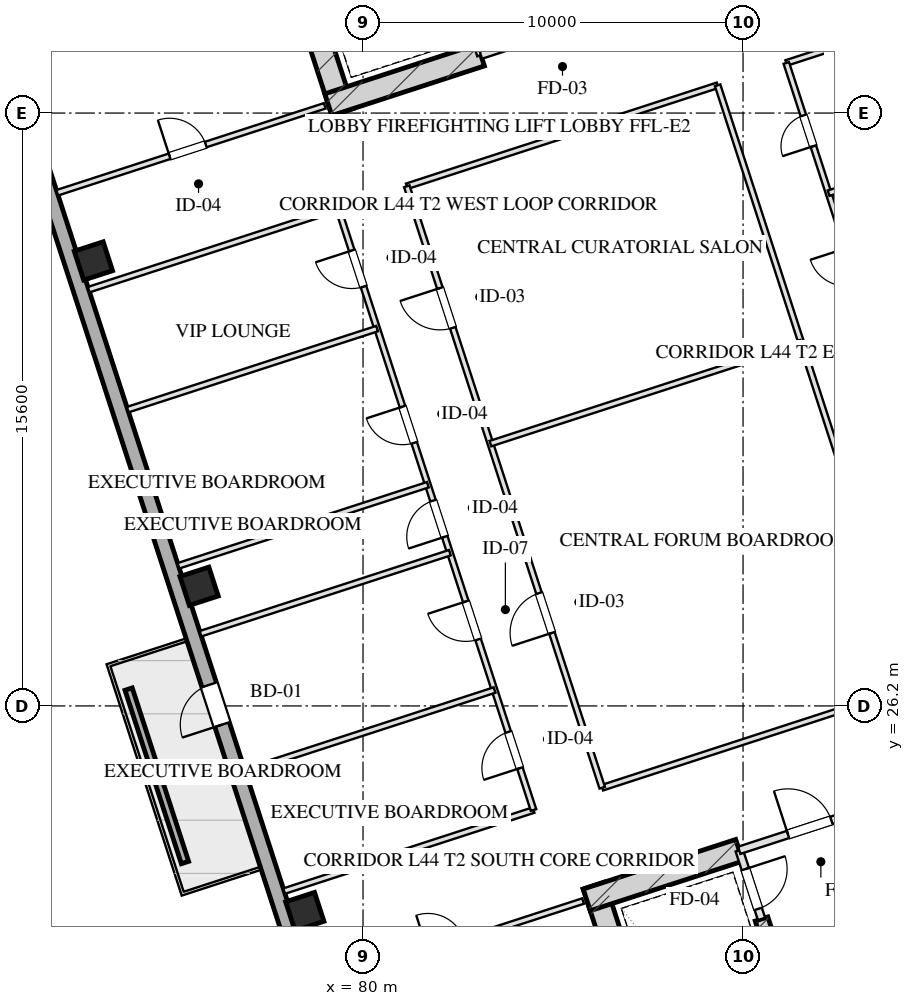
"""IFC4 building model, lengths in metres.
Left out: names, types, materials, properties, quantities, classifications, styles, units other than length and angle.
Written with IfcOpenShell. Run it as: python <this file> out.ifc"""

import sys

from ifc_helpers import new_model, si_unit, direction, frame, frame_2d, origin, origin_2d, place, context, subcontext, project, spatial, rectangle, hollow_rectangle, extrude, element, fill, save


model = new_model("IFC4")
c1 = context("Model", 3, precision=1e-05, world=origin(), true_north=direction((0.0, 1.0)))
c2 = subcontext(c1, "Body", "Model", "MODEL_VIEW")
j1 = project(units=[si_unit("LENGTHUNIT", "METRE"), si_unit("PLANEANGLEUNIT", "RADIAN")], contexts=[c1])
p1 = place(None, origin())
s1 = spatial("IfcSite", under=j1, at=p1, CompositionType="ELEMENT")
p2 = place(p1, origin())
s2 = spatial("IfcBuilding", under=s1, at=p2, CompositionType="ELEMENT")
p3 = place(p2, frame((0.0, 0.0, 166.75)))
s3 = spatial("IfcBuildingStorey", under=s2, at=p3, CompositionType="ELEMENT", Elevation=166.75)
p4 = place(p3, frame((86.078, 21.475, 0.0), z_axis=(0.0, 0.0, 1.0), x_axis=(0.309017938678, -0.951056209472, 0.0)))
e1 = element("IfcWall", 1, at=p4, inside=s3, PredefinedType="SHEAR", context=c2, shape_type="SweptSolid", body=[
    extrude(rectangle(XDim=9.48, YDim=0.6, at=frame_2d((4.74, 0.0))), origin(), (0.0, 0.0, 1.0), 3.45),
])
p5 = place(p3, frame((90.486, 20.594, 0.0), z_axis=(0.0, 0.0, 1.0), x_axis=(0.309020428229, -0.951055400562, 0.0)))
e2 = element("IfcWall", 2, at=p5, inside=s3, PredefinedType="SHEAR", context=c2, shape_type="SweptSolid", body=[
    extrude(rectangle(XDim=6.98, YDim=0.35, at=frame_2d((3.49, 0.0))), origin(), (0.0, 0.0, 1.0), 3.45),
])
p6 = place(p3, frame((85.886, 21.097, 0.0), z_axis=(0.0, 0.0, 1.0), x_axis=(0.951068073652, 0.308981422225, 0.0)))
e3 = element("IfcWall", 3, at=p6, inside=s3, PredefinedType="SHEAR", context=c2, shape_type="SweptSolid", body=[
    extrude(rectangle(XDim=4.22, YDim=0.6, at=frame_2d((2.11, 0.0))), origin(), (0.0, 0.0, 1.0), 3.45),
])
p7 = place(p3, frame((79.466, 41.828, 0.0), z_axis=(0.0, 0.0, 1.0), x_axis=(-0.309041232772, 0.951048640421, 0.0)))
e4 = element("IfcWall", 4, at=p7, inside=s3, PredefinedType="SHEAR", context=c2, shape_type="SweptSolid", body=[
    extrude(rectangle(XDim=9.48, YDim=0.6, at=frame_2d((4.74, 0.0))), origin(), (0.0, 0.0, 1.0), 3.45),
])
p8 = place(p3, frame((79.087, 42.021, 0.0), z_axis=(0.0, 0.0, 1.0), x_axis=(0.951062550203, 0.3089984233, 0.0)))
e5 = element("IfcWall", 5, at=p8, inside=s3, PredefinedType="SHEAR", context=c2, shape_type="SweptSolid", body=[
    extrude(rectangle(XDim=4.22, YDim=0.6, at=frame_2d((2.11, 0.0))), origin(), (0.0, 0.0, 1.0), 3.45),
])
for number, where, z_axis, x_axis in (
    (6, (78.468, 20.79, 0.0), (0.0, 0.0, 1.0), (0.951, 0.309, 0.0)),
    (7, (75.687, 29.349, 0.0), (0.0, 0.0, 1.0), (0.951, 0.309, 0.0)),
    (8, (72.906, 37.909, 0.0), (0.0, 0.0, 1.0), (0.951, 0.309, 0.0)),
):
    element("IfcColumn", number, at=place(p3, frame(where, z_axis=z_axis, x_axis=x_axis)), inside=s3, PredefinedType="COLUMN", context=c2, shape_type="SweptSolid", body=[
        extrude(hollow_rectangle(XDim=0.8, YDim=0.8, WallThickness=0.028, at=origin_2d()), origin(), (0.0, 0.0, 1.0), 3.451),
    ])
p9 = place(p3, frame((81.776, 8.827, 0.0), z_axis=(0.0, 0.0, 1.0), x_axis=(-0.309014228706, 0.951057414911, 0.0)))
e9 = element("IfcWall", 9, at=p9, inside=s3, PredefinedType="SOLIDWALL", context=c2, shape_type="SweptSolid", body=[
    extrude(rectangle(XDim=42.8, YDim=0.4, at=frame_2d((21.4, 0.0))), origin(), (0.0, 0.0, 1.0), 2.61),
])
p10 = place(p9, frame((17.75, 0.0, 0.0)))
e10 = element("IfcOpeningElement", 10, at=p10, cuts=e9, PredefinedType="OPENING", context=c2, shape_type="SweptSolid", body=[
    extrude(rectangle(XDim=1.1, YDim=2.15, at=frame_2d((0.55, 1.075))), frame((0.0, 0.21, 0.0), z_axis=(0.0, -1.0, 0.0), x_axis=(1.0, 0.0, 0.0)), (0.0, 0.0, 1.0), 0.42),
])
p11 = place(p3, frame((75.315, 22.079, 0.0), z_axis=(0.0, 0.0, 1.0), x_axis=(-0.309032019345, 0.951051634255, 0.0)))
e11 = element("IfcWall", 11, at=p11, inside=s3, PredefinedType="PARAPET", context=c2, shape_type="SweptSolid", body=[
    extrude(rectangle(XDim=4.8, YDim=0.2, at=frame_2d((2.4, 0.0))), origin(), (0.0, 0.0, 1.0), 0.75),
])
p12 = place(p3, frame((89.899, 22.401, 0.0), z_axis=(0.0, 0.0, 1.0), x_axis=(0.308932062672, -0.951084108086, 0.0)))
e12 = element("IfcWall", 12, at=p12, inside=s3, PredefinedType="PARTITIONING", context=c2, shape_type="SweptSolid", body=[
    extrude(rectangle(XDim=1.9, YDim=0.2, at=frame_2d((0.95, 0.0))), origin(), (0.0, 0.0, 1.0), 3.175),
])
p13 = place(p12, frame((0.52, 0.0, 0.0)))
e13 = element("IfcOpeningElement", 13, at=p13, cuts=e12, PredefinedType="OPENING", context=c2, shape_type="SweptSolid", body=[
    extrude(rectangle(XDim=1.1, YDim=2.05, at=frame_2d((0.55, 1.025))), frame((0.0, 0.11, 0.0), z_axis=(0.0, -1.0, 0.0), x_axis=(1.0, 0.0, 0.0)), (0.0, 0.0, 1.0), 0.22),
])
p14 = place(p3, frame((89.899, 22.401, 0.0), z_axis=(0.0, 0.0, 1.0), x_axis=(0.951046716504, 0.309047153403, 0.0)))
e14 = element("IfcWall", 14, at=p14, inside=s3, PredefinedType="PARTITIONING", context=c2, shape_type="SweptSolid", body=[
    extrude(rectangle(XDim=3.83, YDim=0.2, at=frame_2d((1.915, 0.0))), origin(), (0.0, 0.0, 1.0), 3.175),
])
p15 = place(p14, frame((1.35, 0.0, 0.0)))
e15 = element("IfcOpeningElement", 15, at=p15, cuts=e14, PredefinedType="OPENING", context=c2, shape_type="SweptSolid", body=[
    extrude(rectangle(XDim=1.2, YDim=2.05, at=frame_2d((0.6, 1.025))), frame((0.0, 0.11, 0.0), z_axis=(0.0, -1.0, 0.0), x_axis=(1.0, 0.0, 0.0)), (0.0, 0.0, 1.0), 0.22),
])
p16 = place(p3, frame((83.101, 43.324, 0.0), z_axis=(0.0, 0.0, 1.0), x_axis=(-0.309048298632, 0.951046344356, 0.0)))
e16 = element("IfcWall", 16, at=p16, inside=s3, PredefinedType="PARTITIONING", context=c2, shape_type="SweptSolid", body=[
    extrude(rectangle(XDim=1.9, YDim=0.2, at=frame_2d((0.95, 0.0))), origin(), (0.0, 0.0, 1.0), 3.175),
])
p17 = place(p16, frame((0.52, 0.0, 0.0)))
e17 = element("IfcOpeningElement", 17, at=p17, cuts=e16, PredefinedType="OPENING", context=c2, shape_type="SweptSolid", body=[
    extrude(rectangle(XDim=1.1, YDim=2.05, at=frame_2d((0.55, 1.025))), frame((0.0, 0.11, 0.0), z_axis=(0.0, -1.0, 0.0), x_axis=(1.0, 0.0, 0.0)), (0.0, 0.0, 1.0), 0.22),
])
p18 = place(p3, frame((83.101, 43.324, 0.0), z_axis=(0.0, 0.0, 1.0), x_axis=(0.951052804469, 0.309028417967, 0.0)))
e18 = element("IfcWall", 18, at=p18, inside=s3, PredefinedType="PARTITIONING", context=c2, shape_type="SweptSolid", body=[
    extrude(rectangle(XDim=3.83, YDim=0.2, at=frame_2d((1.915, 0.0))), origin(), (0.0, 0.0, 1.0), 3.175),
])
p19 = place(p18, frame((1.35, 0.0, 0.0)))
e19 = element("IfcOpeningElement", 19, at=p19, cuts=e18, PredefinedType="OPENING", context=c2, shape_type="SweptSolid", body=[
    extrude(rectangle(XDim=1.2, YDim=2.05, at=frame_2d((0.6, 1.025))), frame((0.0, 0.11, 0.0), z_axis=(0.0, -1.0, 0.0), x_axis=(1.0, 0.0, 0.0)), (0.0, 0.0, 1.0), 0.22),
])
p20 = place(p3, frame((78.753, 18.78, 0.0), z_axis=(0.0, 0.0, 1.0), x_axis=(0.951060977215, 0.309003264738, 0.0)))
e20 = element("IfcWall", 20, at=p20, inside=s3, PredefinedType="PARTITIONING", context=c2, shape_type="SweptSolid", body=[
    extrude(rectangle(XDim=7.4, YDim=0.15, at=frame_2d((3.7, 0.0))), origin(), (0.0, 0.0, 1.0), 3.175),
])
p21 = place(p20, frame((3.108, 0.0, 0.0)))
e21 = element("IfcOpeningElement", 21, at=p21, cuts=e20, PredefinedType="OPENING", context=c2, shape_type="SweptSolid", body=[
    extrude(rectangle(XDim=1.0, YDim=2.05, at=frame_2d((0.5, 1.025))), frame((0.0, 0.085, 0.0), z_axis=(0.0, -1.0, 0.0), x_axis=(1.0, 0.0, 0.0)), (0.0, 0.0, 1.0), 0.17),
])
p22 = place(p3, frame((71.955, 39.703, 0.0), z_axis=(0.0, 0.0, 1.0), x_axis=(0.951060977215, 0.309003264738, 0.0)))
e22 = element("IfcWall", 22, at=p22, inside=s3, PredefinedType="PARTITIONING", context=c2, shape_type="SweptSolid", body=[
    extrude(rectangle(XDim=7.4, YDim=0.15, at=frame_2d((3.7, 0.0))), origin(), (0.0, 0.0, 1.0), 3.175),
])
p23 = place(p22, frame((3.108, 0.0, 0.0)))
e23 = element("IfcOpeningElement", 23, at=p23, cuts=e22, PredefinedType="OPENING", context=c2, shape_type="SweptSolid", body=[
    extrude(rectangle(XDim=1.0, YDim=2.05, at=frame_2d((0.5, 1.025))), frame((0.0, 0.085, 0.0), z_axis=(0.0, -1.0, 0.0), x_axis=(1.0, 0.0, 0.0)), (0.0, 0.0, 1.0), 0.17),
])
p24 = place(p3, frame((77.925, 21.328, 0.0), z_axis=(0.0, 0.0, 1.0), x_axis=(0.951061887302, 0.309000463626, 0.0)))
e24 = element("IfcWall", 24, at=p24, inside=s3, PredefinedType="PARTITIONING", context=c2, shape_type="SweptSolid", body=[
    extrude(rectangle(XDim=6.9, YDim=0.15, at=frame_2d((3.45, 0.0))), origin(), (0.0, 0.0, 1.0), 3.175),
])
p25 = place(p3, frame((86.294, 24.048, 0.0), z_axis=(0.0, 0.0, 1.0), x_axis=(0.951052008164, 0.309030868631, 0.0)))
e25 = element("IfcWall", 25, at=p25, inside=s3, PredefinedType="PARTITIONING", context=c2, shape_type="SweptSolid", body=[
    extrude(rectangle(XDim=8.6, YDim=0.15, at=frame_2d((4.3, 0.0))), origin(), (0.0, 0.0, 1.0), 3.175),
])
p26 = place(p3, frame((72.783, 37.154, 0.0), z_axis=(0.0, 0.0, 1.0), x_axis=(0.951051488548, 0.309032467762, 0.0)))
e26 = element("IfcWall", 26, at=p26, inside=s3, PredefinedType="PARTITIONING", context=c2, shape_type="SweptSolid", body=[
    extrude(rectangle(XDim=6.9, YDim=0.15, at=frame_2d((3.45, 0.0))), origin(), (0.0, 0.0, 1.0), 3.175),
])
p27 = place(p3, frame((81.152, 39.873, 0.0), z_axis=(0.0, 0.0, 1.0), x_axis=(0.951057640494, 0.309013534425, 0.0)))
e27 = element("IfcWall", 27, at=p27, inside=s3, PredefinedType="PARTITIONING", context=c2, shape_type="SweptSolid", body=[
    extrude(rectangle(XDim=8.6, YDim=0.15, at=frame_2d((4.3, 0.0))), origin(), (0.0, 0.0, 1.0), 3.175),
])
p28 = place(p3, frame((91.138, 43.118, 0.0), z_axis=(0.0, 0.0, 1.0), x_axis=(0.951054972381, 0.309021746015, 0.0)))
e28 = element("IfcWall", 28, at=p28, inside=s3, PredefinedType="PARTITIONING", context=c2, shape_type="SweptSolid", body=[
    extrude(rectangle(XDim=11.5, YDim=0.15, at=frame_2d((5.75, 0.0))), origin(), (0.0, 0.0, 1.0), 3.175),
])
p29 = place(p3, frame((84.487, 23.46, 0.0), z_axis=(0.0, 0.0, 1.0), x_axis=(-0.30901773025, 0.951056277195, 0.0)))
e29 = element("IfcWall", 29, at=p29, inside=s3, PredefinedType="PARTITIONING", context=c2, shape_type="SweptSolid", body=[
    extrude(rectangle(XDim=16.64, YDim=0.15, at=frame_2d((8.32, 0.0))), origin(), (0.0, 0.0, 1.0), 3.175),
])
p30 = place(p29, frame((1.16, 0.0, 0.0)))
e30 = element("IfcOpeningElement", 30, at=p30, cuts=e29, PredefinedType="OPENING", context=c2, shape_type="SweptSolid", body=[
    extrude(rectangle(XDim=1.0, YDim=2.05, at=frame_2d((0.5, 1.025))), frame((0.0, 0.085, 0.0), z_axis=(0.0, -1.0, 0.0), x_axis=(1.0, 0.0, 0.0)), (0.0, 0.0, 1.0), 0.17),
])
p31 = place(p29, frame((4.72, 0.0, 0.0)))
e31 = element("IfcOpeningElement", 31, at=p31, cuts=e29, PredefinedType="OPENING", context=c2, shape_type="SweptSolid", body=[
    extrude(rectangle(XDim=1.05, YDim=2.05, at=frame_2d((0.525, 1.025))), frame((0.0, 0.085, 0.0), z_axis=(0.0, -1.0, 0.0), x_axis=(1.0, 0.0, 0.0)), (0.0, 0.0, 1.0), 0.17),
])
p32 = place(p29, frame((7.56, 0.0, 0.0)))
e32 = element("IfcOpeningElement", 32, at=p32, cuts=e29, PredefinedType="OPENING", context=c2, shape_type="SweptSolid", body=[
    extrude(rectangle(XDim=1.0, YDim=2.05, at=frame_2d((0.5, 1.025))), frame((0.0, 0.085, 0.0), z_axis=(0.0, -1.0, 0.0), x_axis=(1.0, 0.0, 0.0)), (0.0, 0.0, 1.0), 0.17),
])
p33 = place(p29, frame((10.16, 0.0, 0.0)))
e33 = element("IfcOpeningElement", 33, at=p33, cuts=e29, PredefinedType="OPENING", context=c2, shape_type="SweptSolid", body=[
    extrude(rectangle(XDim=1.0, YDim=2.05, at=frame_2d((0.5, 1.025))), frame((0.0, 0.085, 0.0), z_axis=(0.0, -1.0, 0.0), x_axis=(1.0, 0.0, 0.0)), (0.0, 0.0, 1.0), 0.17),
])
p34 = place(p29, frame((14.48, 0.0, 0.0)))
e34 = element("IfcOpeningElement", 34, at=p34, cuts=e29, PredefinedType="OPENING", context=c2, shape_type="SweptSolid", body=[
    extrude(rectangle(XDim=1.0, YDim=2.05, at=frame_2d((0.5, 1.025))), frame((0.0, 0.085, 0.0), z_axis=(0.0, -1.0, 0.0), x_axis=(1.0, 0.0, 0.0)), (0.0, 0.0, 1.0), 0.17),
])
p35 = place(p3, frame((86.294, 24.048, 0.0), z_axis=(0.0, 0.0, 1.0), x_axis=(-0.309004459387, 0.951060589068, 0.0)))
e35 = element("IfcWall", 35, at=p35, inside=s3, PredefinedType="PARTITIONING", context=c2, shape_type="SweptSolid", body=[
    extrude(rectangle(XDim=16.64, YDim=0.15, at=frame_2d((8.32, 0.0))), origin(), (0.0, 0.0, 1.0), 3.175),
])
p36 = place(p35, frame((4.284, 0.0, 0.0)))
e36 = element("IfcOpeningElement", 36, at=p36, cuts=e35, PredefinedType="OPENING", context=c2, shape_type="SweptSolid", body=[
    extrude(rectangle(XDim=1.1, YDim=2.05, at=frame_2d((0.55, 1.025))), frame((0.0, 0.085, 0.0), z_axis=(0.0, -1.0, 0.0), x_axis=(1.0, 0.0, 0.0)), (0.0, 0.0, 1.0), 0.17),
])
p37 = place(p35, frame((12.724, 0.0, 0.0)))
e37 = element("IfcOpeningElement", 37, at=p37, cuts=e35, PredefinedType="OPENING", context=c2, shape_type="SweptSolid", body=[
    extrude(rectangle(XDim=1.1, YDim=2.05, at=frame_2d((0.55, 1.025))), frame((0.0, 0.085, 0.0), z_axis=(0.0, -1.0, 0.0), x_axis=(1.0, 0.0, 0.0)), (0.0, 0.0, 1.0), 0.17),
])
p38 = place(p3, frame((94.473, 26.705, 0.0), z_axis=(0.0, 0.0, 1.0), x_axis=(-0.309022042254, 0.951054876125, 0.0)))
e38 = element("IfcWall", 38, at=p38, inside=s3, PredefinedType="PARTITIONING", context=c2, shape_type="SweptSolid", body=[
    extrude(rectangle(XDim=16.64, YDim=0.15, at=frame_2d((8.32, 0.0))), origin(), (0.0, 0.0, 1.0), 3.175),
])
p39 = place(p3, frame((96.28, 27.292, 0.0), z_axis=(0.0, 0.0, 1.0), x_axis=(-0.309008771245, 0.951059188113, 0.0)))
e39 = element("IfcWall", 39, at=p39, inside=s3, PredefinedType="PARTITIONING", context=c2, shape_type="SweptSolid", body=[
    extrude(rectangle(XDim=16.64, YDim=0.15, at=frame_2d((8.32, 0.0))), origin(), (0.0, 0.0, 1.0), 3.175),
])
p40 = place(p39, frame((1.526, 0.0, 0.0)))
e40 = element("IfcOpeningElement", 40, at=p40, cuts=e39, PredefinedType="OPENING", context=c2, shape_type="SweptSolid", body=[
    extrude(rectangle(XDim=1.0, YDim=2.05, at=frame_2d((0.5, 1.025))), frame((0.0, 0.085, 0.0), z_axis=(0.0, -1.0, 0.0), x_axis=(1.0, 0.0, 0.0)), (0.0, 0.0, 1.0), 0.17),
])
p41 = place(p39, frame((6.026, 0.0, 0.0)))
e41 = element("IfcOpeningElement", 41, at=p41, cuts=e39, PredefinedType="OPENING", context=c2, shape_type="SweptSolid", body=[
    extrude(rectangle(XDim=1.05, YDim=2.05, at=frame_2d((0.525, 1.025))), frame((0.0, 0.085, 0.0), z_axis=(0.0, -1.0, 0.0), x_axis=(1.0, 0.0, 0.0)), (0.0, 0.0, 1.0), 0.17),
])
p42 = place(p39, frame((10.519, 0.0, 0.0)))
e42 = element("IfcOpeningElement", 42, at=p42, cuts=e39, PredefinedType="OPENING", context=c2, shape_type="SweptSolid", body=[
    extrude(rectangle(XDim=1.0, YDim=2.05, at=frame_2d((0.5, 1.025))), frame((0.0, 0.085, 0.0), z_axis=(0.0, -1.0, 0.0), x_axis=(1.0, 0.0, 0.0)), (0.0, 0.0, 1.0), 0.17),
])
p43 = place(p39, frame((14.338, 0.0, 0.0)))
e43 = element("IfcOpeningElement", 43, at=p43, cuts=e39, PredefinedType="OPENING", context=c2, shape_type="SweptSolid", body=[
    extrude(rectangle(XDim=0.85, YDim=2.05, at=frame_2d((0.425, 1.025))), frame((0.0, 0.085, 0.0), z_axis=(0.0, -1.0, 0.0), x_axis=(1.0, 0.0, 0.0)), (0.0, 0.0, 1.0), 0.17),
])
p44 = place(p3, frame((83.352, 33.102, 0.0), z_axis=(0.0, 0.0, 1.0), x_axis=(0.951057640494, 0.309013534425, 0.0)))
e44 = element("IfcWall", 44, at=p44, inside=s3, PredefinedType="PARTITIONING", context=c2, shape_type="SweptSolid", body=[
    extrude(rectangle(XDim=8.6, YDim=0.15, at=frame_2d((4.3, 0.0))), origin(), (0.0, 0.0, 1.0), 3.175),
])
for number, where, z_axis, x_axis in (
    (45, (76.899, 24.486, 0.0), (0.0, 0.0, 1.0), (0.951, 0.309, 0.0)),
    (46, (75.725, 28.1, 0.0), (0.0, 0.0, 1.0), (0.951, 0.309, 0.0)),
    (47, (75.144, 29.888, 0.0), (0.0, 0.0, 1.0), (0.951, 0.309, 0.0)),
    (48, (73.809, 33.996, 0.0), (0.0, 0.0, 1.0), (0.951, 0.309, 0.0)),
):
    element("IfcWall", number, at=place(p3, frame(where, z_axis=z_axis, x_axis=x_axis)), inside=s3, PredefinedType="PARTITIONING", context=c2, shape_type="SweptSolid", body=[
        extrude(rectangle(XDim=6.9, YDim=0.15, at=frame_2d((3.45, 0.0))), origin(), (0.0, 0.0, 1.0), 3.175),
    ])
p45 = place(p3, frame((92.251, 39.691, 0.0), z_axis=(0.0, 0.0, 1.0), x_axis=(0.951063238644, 0.308996304347, 0.0)))
e49 = element("IfcWall", 49, at=p45, inside=s3, PredefinedType="PARTITIONING", context=c2, shape_type="SweptSolid", body=[
    extrude(rectangle(XDim=11.5, YDim=0.15, at=frame_2d((5.75, 0.0))), origin(), (0.0, 0.0, 1.0), 3.175),
])
p46 = place(p10, origin())
e50 = element("IfcDoor", 50, at=p46, inside=s3, OperationType="SINGLE_SWING_LEFT", PredefinedType="DOOR", context=c2, shape_type="SweptSolid", body=[
    extrude(rectangle(XDim=1.1, YDim=2.15, at=frame_2d((0.55, 1.075))), frame((0.0, 0.025, 0.0), z_axis=(0.0, -1.0, 0.0), x_axis=(1.0, 0.0, 0.0)), (0.0, 0.0, 1.0), 0.05),
])
fill(e10, e50)
p47 = place(p13, origin())
e51 = element("IfcDoor", 51, at=p47, inside=s3, OperationType="SINGLE_SWING_LEFT", PredefinedType="DOOR", context=c2, shape_type="SweptSolid", body=[
    extrude(rectangle(XDim=1.1, YDim=2.05, at=frame_2d((0.55, 1.025))), frame((0.0, 0.025, 0.0), z_axis=(0.0, -1.0, 0.0), x_axis=(1.0, 0.0, 0.0)), (0.0, 0.0, 1.0), 0.05),
])
fill(e13, e51)
p48 = place(p15, origin())
e52 = element("IfcDoor", 52, at=p48, inside=s3, OperationType="SINGLE_SWING_LEFT", PredefinedType="DOOR", context=c2, shape_type="SweptSolid", body=[
    extrude(rectangle(XDim=1.2, YDim=2.05, at=frame_2d((0.6, 1.025))), frame((0.0, 0.025, 0.0), z_axis=(0.0, -1.0, 0.0), x_axis=(1.0, 0.0, 0.0)), (0.0, 0.0, 1.0), 0.05),
])
fill(e15, e52)
p49 = place(p23, origin())
e53 = element("IfcDoor", 53, at=p49, inside=s3, OperationType="SINGLE_SWING_LEFT", PredefinedType="DOOR", context=c2, shape_type="SweptSolid", body=[
    extrude(rectangle(XDim=1.0, YDim=2.05, at=frame_2d((0.5, 1.025))), frame((0.0, 0.025, 0.0), z_axis=(0.0, -1.0, 0.0), x_axis=(1.0, 0.0, 0.0)), (0.0, 0.0, 1.0), 0.05),
])
fill(e23, e53)
p50 = place(p30, origin())
e54 = element("IfcDoor", 54, at=p50, inside=s3, OperationType="SINGLE_SWING_LEFT", PredefinedType="DOOR", context=c2, shape_type="SweptSolid", body=[
    extrude(rectangle(XDim=1.0, YDim=2.05, at=frame_2d((0.5, 1.025))), frame((0.0, 0.025, 0.0), z_axis=(0.0, -1.0, 0.0), x_axis=(1.0, 0.0, 0.0)), (0.0, 0.0, 1.0), 0.05),
])
fill(e30, e54)
p51 = place(p31, origin())
e55 = element("IfcDoor", 55, at=p51, inside=s3, OperationType="SINGLE_SWING_RIGHT", PredefinedType="DOOR", context=c2, shape_type="SweptSolid", body=[
    extrude(rectangle(XDim=1.05, YDim=2.05, at=frame_2d((0.525, 1.025))), frame((0.0, 0.025, 0.0), z_axis=(0.0, -1.0, 0.0), x_axis=(1.0, 0.0, 0.0)), (0.0, 0.0, 1.0), 0.05),
])
fill(e31, e55)
p52 = place(p32, origin())
e56 = element("IfcDoor", 56, at=p52, inside=s3, OperationType="SINGLE_SWING_LEFT", PredefinedType="DOOR", context=c2, shape_type="SweptSolid", body=[
    extrude(rectangle(XDim=1.0, YDim=2.05, at=frame_2d((0.5, 1.025))), frame((0.0, 0.025, 0.0), z_axis=(0.0, -1.0, 0.0), x_axis=(1.0, 0.0, 0.0)), (0.0, 0.0, 1.0), 0.05),
])
fill(e32, e56)
p53 = place(p33, origin())
e57 = element("IfcDoor", 57, at=p53, inside=s3, OperationType="SINGLE_SWING_RIGHT", PredefinedType="DOOR", context=c2, shape_type="SweptSolid", body=[
    extrude(rectangle(XDim=1.0, YDim=2.05, at=frame_2d((0.5, 1.025))), frame((0.0, 0.025, 0.0), z_axis=(0.0, -1.0, 0.0), x_axis=(1.0, 0.0, 0.0)), (0.0, 0.0, 1.0), 0.05),
])
fill(e33, e57)
p54 = place(p34, origin())
e58 = element("IfcDoor", 58, at=p54, inside=s3, OperationType="SINGLE_SWING_RIGHT", PredefinedType="DOOR", context=c2, shape_type="SweptSolid", body=[
    extrude(rectangle(XDim=1.0, YDim=2.05, at=frame_2d((0.5, 1.025))), frame((0.0, 0.025, 0.0), z_axis=(0.0, -1.0, 0.0), x_axis=(1.0, 0.0, 0.0)), (0.0, 0.0, 1.0), 0.05),
])
fill(e34, e58)
p55 = place(p36, origin())
e59 = element("IfcDoor", 59, at=p55, inside=s3, OperationType="SINGLE_SWING_LEFT", PredefinedType="DOOR", context=c2, shape_type="SweptSolid", body=[
    extrude(rectangle(XDim=1.1, YDim=2.05, at=frame_2d((0.55, 1.025))), frame((0.0, 0.025, 0.0), z_axis=(0.0, -1.0, 0.0), x_axis=(1.0, 0.0, 0.0)), (0.0, 0.0, 1.0), 0.05),
])
fill(e36, e59)
p56 = place(p37, origin())
e60 = element("IfcDoor", 60, at=p56, inside=s3, OperationType="SINGLE_SWING_RIGHT", PredefinedType="DOOR", context=c2, shape_type="SweptSolid", body=[
    extrude(rectangle(XDim=1.1, YDim=2.05, at=frame_2d((0.55, 1.025))), frame((0.0, 0.025, 0.0), z_axis=(0.0, -1.0, 0.0), x_axis=(1.0, 0.0, 0.0)), (0.0, 0.0, 1.0), 0.05),
])
fill(e37, e60)
p57 = place(p43, origin())
e61 = element("IfcDoor", 61, at=p57, inside=s3, OperationType="SINGLE_SWING_LEFT", PredefinedType="DOOR", context=c2, shape_type="SweptSolid", body=[
    extrude(rectangle(XDim=0.85, YDim=2.05, at=frame_2d((0.425, 1.025))), frame((0.0, 0.025, 0.0), z_axis=(0.0, -1.0, 0.0), x_axis=(1.0, 0.0, 0.0)), (0.0, 0.0, 1.0), 0.05),
])
fill(e43, e61)
save(model, sys.argv[1])
